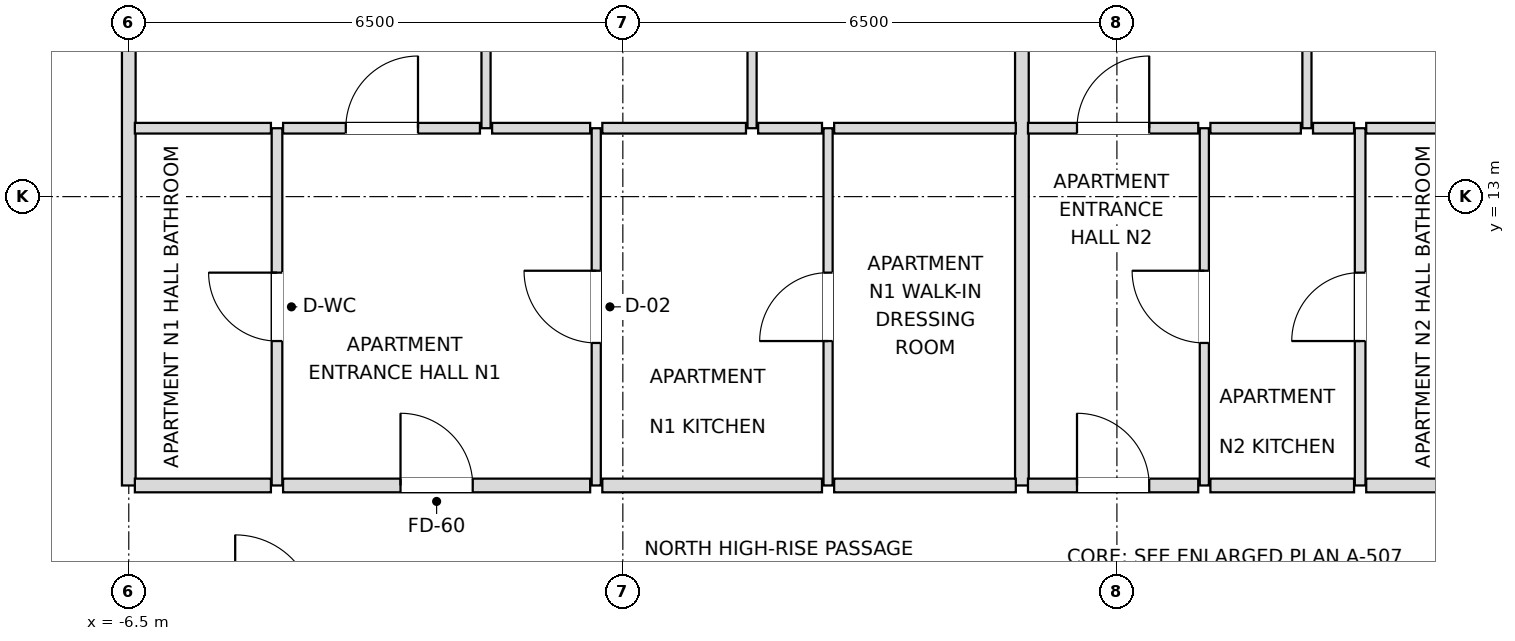
"""IFC4 building model, lengths in metres.
Left out: names, types, materials, properties, quantities, classifications, styles, units other than length and angle.
Written with IfcOpenShell. Run it as: python <this file> out.ifc"""

import sys

from ifc_helpers import new_model, si_unit, direction, frame, frame_2d, origin, place, context, subcontext, project, spatial, rectangle, extrude, element, fill, save


model = new_model("IFC4")
c1 = context("Model", 3, precision=1e-05, world=origin(), true_north=direction((0.0, 1.0)))
c2 = subcontext(c1, "Body", "Model", "MODEL_VIEW")
j1 = project(units=[si_unit("LENGTHUNIT", "METRE"), si_unit("PLANEANGLEUNIT", "RADIAN")], contexts=[c1])
p1 = place(None, origin())
s1 = spatial("IfcSite", under=j1, at=p1, CompositionType="ELEMENT")
p2 = place(p1, origin())
s2 = spatial("IfcBuilding", under=s1, at=p2, CompositionType="ELEMENT")
p3 = place(p2, frame((0.0, 0.0, 243.9)))
s3 = spatial("IfcBuildingStorey", under=s2, at=p3, CompositionType="ELEMENT", Elevation=243.9)
p4 = place(p3, frame((-6.5, 9.2, 0.0), z_axis=(0.0, 0.0, 1.0), x_axis=(0.0, 1.0, 0.0)))
e1 = element("IfcWall", 1, at=p4, inside=s3, PredefinedType="PARTITIONING", context=c2, shape_type="SweptSolid", body=[
    extrude(rectangle(XDim=10.7, YDim=0.18, at=frame_2d((5.35, 0.0))), origin(), (0.0, 0.0, 1.0), 2.826),
])
p5 = place(p3, frame((-4.55, 9.2, 0.0), z_axis=(0.0, 0.0, 1.0), x_axis=(0.0, 1.0, 0.0)))
e2 = element("IfcWall", 2, at=p5, inside=s3, PredefinedType="PARTITIONING", context=c2, shape_type="SweptSolid", body=[
    extrude(rectangle(XDim=4.7, YDim=0.14, at=frame_2d((2.35, 0.0))), origin(), (0.0, 0.0, 1.0), 3.38),
])
p6 = place(p5, frame((1.9, 0.0, 0.0)))
e3 = element("IfcOpeningElement", 3, at=p6, cuts=e2, PredefinedType="OPENING", context=c2, shape_type="SweptSolid", body=[
    extrude(rectangle(XDim=0.9, YDim=2.1, at=frame_2d((0.45, 1.05))), frame((0.0, 0.08, 0.0), z_axis=(0.0, -1.0, 0.0), x_axis=(1.0, 0.0, 0.0)), (0.0, 0.0, 1.0), 0.16),
])
p7 = place(p3, frame((-1.8, 13.9, 0.0), z_axis=(0.0, 0.0, 1.0), x_axis=(0.0, 1.0, 0.0)))
e4 = element("IfcWall", 4, at=p7, inside=s3, PredefinedType="PARTITIONING", context=c2, shape_type="SweptSolid", body=[
    extrude(rectangle(XDim=6.0, YDim=0.12, at=frame_2d((3.0, 0.0))), origin(), (0.0, 0.0, 1.0), 3.018),
])
p8 = place(p7, frame((2.55, 0.0, 0.0)))
e5 = element("IfcOpeningElement", 5, at=p8, cuts=e4, PredefinedType="OPENING", context=c2, shape_type="SweptSolid", body=[
    extrude(rectangle(XDim=0.9, YDim=2.1, at=frame_2d((0.45, 1.05))), frame((0.0, 0.07, 0.0), z_axis=(0.0, -1.0, 0.0), x_axis=(1.0, 0.0, 0.0)), (0.0, 0.0, 1.0), 0.14),
])
p9 = place(p3, frame((-0.35, 9.2, 0.0), z_axis=(0.0, 0.0, 1.0), x_axis=(0.0, 1.0, 0.0)))
e6 = element("IfcWall", 6, at=p9, inside=s3, PredefinedType="PARTITIONING", context=c2, shape_type="SweptSolid", body=[
    extrude(rectangle(XDim=4.7, YDim=0.12, at=frame_2d((2.35, 0.0))), origin(), (0.0, 0.0, 1.0), 3.38),
])
p10 = place(p9, frame((1.875, 0.0, 0.0)))
e7 = element("IfcOpeningElement", 7, at=p10, cuts=e6, PredefinedType="OPENING", context=c2, shape_type="SweptSolid", body=[
    extrude(rectangle(XDim=0.95, YDim=2.1, at=frame_2d((0.475, 1.05))), frame((0.0, 0.07, 0.0), z_axis=(0.0, -1.0, 0.0), x_axis=(1.0, 0.0, 0.0)), (0.0, 0.0, 1.0), 0.14),
])
p11 = place(p3, frame((1.7, 13.9, 0.0), z_axis=(0.0, 0.0, 1.0), x_axis=(0.0, 1.0, 0.0)))
e8 = element("IfcWall", 8, at=p11, inside=s3, PredefinedType="PARTITIONING", context=c2, shape_type="SweptSolid", body=[
    extrude(rectangle(XDim=6.0, YDim=0.12, at=frame_2d((3.0, 0.0))), origin(), (0.0, 0.0, 1.0), 3.018),
])
p12 = place(p11, frame((2.55, 0.0, 0.0)))
e9 = element("IfcOpeningElement", 9, at=p12, cuts=e8, PredefinedType="OPENING", context=c2, shape_type="SweptSolid", body=[
    extrude(rectangle(XDim=0.9, YDim=2.1, at=frame_2d((0.45, 1.05))), frame((0.0, 0.07, 0.0), z_axis=(0.0, -1.0, 0.0), x_axis=(1.0, 0.0, 0.0)), (0.0, 0.0, 1.0), 0.14),
])
p13 = place(p3, frame((2.7, 9.2, 0.0), z_axis=(0.0, 0.0, 1.0), x_axis=(0.0, 1.0, 0.0)))
e10 = element("IfcWall", 10, at=p13, inside=s3, PredefinedType="PARTITIONING", context=c2, shape_type="SweptSolid", body=[
    extrude(rectangle(XDim=4.7, YDim=0.12, at=frame_2d((2.35, 0.0))), origin(), (0.0, 0.0, 1.0), 3.38),
])
p14 = place(p13, frame((1.9, 0.0, 0.0)))
e11 = element("IfcOpeningElement", 11, at=p14, cuts=e10, PredefinedType="OPENING", context=c2, shape_type="SweptSolid", body=[
    extrude(rectangle(XDim=0.9, YDim=2.1, at=frame_2d((0.45, 1.05))), frame((0.0, 0.07, 0.0), z_axis=(0.0, -1.0, 0.0), x_axis=(1.0, 0.0, 0.0)), (0.0, 0.0, 1.0), 0.14),
])
p15 = place(p3, frame((5.25, 9.2, 0.0), z_axis=(0.0, 0.0, 1.0), x_axis=(0.0, 1.0, 0.0)))
e12 = element("IfcWall", 12, at=p15, inside=s3, PredefinedType="PARTITIONING", context=c2, shape_type="SweptSolid", body=[
    extrude(rectangle(XDim=10.7, YDim=0.18, at=frame_2d((5.35, 0.0))), origin(), (0.0, 0.0, 1.0), 3.018),
])
p16 = place(p3, frame((7.65, 9.2, 0.0), z_axis=(0.0, 0.0, 1.0), x_axis=(0.0, 1.0, 0.0)))
e13 = element("IfcWall", 13, at=p16, inside=s3, PredefinedType="PARTITIONING", context=c2, shape_type="SweptSolid", body=[
    extrude(rectangle(XDim=4.7, YDim=0.12, at=frame_2d((2.35, 0.0))), origin(), (0.0, 0.0, 1.0), 2.826),
])
p17 = place(p16, frame((1.875, 0.0, 0.0)))
e14 = element("IfcOpeningElement", 14, at=p17, cuts=e13, PredefinedType="OPENING", context=c2, shape_type="SweptSolid", body=[
    extrude(rectangle(XDim=0.95, YDim=2.1, at=frame_2d((0.475, 1.05))), frame((0.0, 0.07, 0.0), z_axis=(0.0, -1.0, 0.0), x_axis=(1.0, 0.0, 0.0)), (0.0, 0.0, 1.0), 0.14),
])
p18 = place(p3, frame((9.0, 13.9, 0.0), z_axis=(0.0, 0.0, 1.0), x_axis=(0.0, 1.0, 0.0)))
e15 = element("IfcWall", 15, at=p18, inside=s3, PredefinedType="PARTITIONING", context=c2, shape_type="SweptSolid", body=[
    extrude(rectangle(XDim=6.0, YDim=0.12, at=frame_2d((3.0, 0.0))), origin(), (0.0, 0.0, 1.0), 3.38),
])
p19 = place(p18, frame((2.55, 0.0, 0.0)))
e16 = element("IfcOpeningElement", 16, at=p19, cuts=e15, PredefinedType="OPENING", context=c2, shape_type="SweptSolid", body=[
    extrude(rectangle(XDim=0.9, YDim=2.1, at=frame_2d((0.45, 1.05))), frame((0.0, 0.07, 0.0), z_axis=(0.0, -1.0, 0.0), x_axis=(1.0, 0.0, 0.0)), (0.0, 0.0, 1.0), 0.14),
])
p20 = place(p3, frame((9.7, 9.2, 0.0), z_axis=(0.0, 0.0, 1.0), x_axis=(0.0, 1.0, 0.0)))
e17 = element("IfcWall", 17, at=p20, inside=s3, PredefinedType="PARTITIONING", context=c2, shape_type="SweptSolid", body=[
    extrude(rectangle(XDim=4.7, YDim=0.14, at=frame_2d((2.35, 0.0))), origin(), (0.0, 0.0, 1.0), 2.826),
])
p21 = place(p20, frame((1.9, 0.0, 0.0)))
e18 = element("IfcOpeningElement", 18, at=p21, cuts=e17, PredefinedType="OPENING", context=c2, shape_type="SweptSolid", body=[
    extrude(rectangle(XDim=0.9, YDim=2.1, at=frame_2d((0.45, 1.05))), frame((0.0, 0.08, 0.0), z_axis=(0.0, -1.0, 0.0), x_axis=(1.0, 0.0, 0.0)), (0.0, 0.0, 1.0), 0.16),
])
p22 = place(p3, frame((-6.42, 9.2, 0.0), z_axis=(0.0, 0.0, 1.0), x_axis=(1.0, 0.0, 0.0)))
e19 = element("IfcWall", 19, at=p22, inside=s3, PredefinedType="PARTITIONING", context=c2, shape_type="SweptSolid", body=[
    extrude(rectangle(XDim=1.79, YDim=0.18, at=frame_2d((0.895, 0.0))), origin(), (0.0, 0.0, 1.0), 3.38),
])
p23 = place(p3, frame((-4.47, 9.2, 0.0), z_axis=(0.0, 0.0, 1.0), x_axis=(1.0, 0.0, 0.0)))
e20 = element("IfcWall", 20, at=p23, inside=s3, PredefinedType="PARTITIONING", context=c2, shape_type="SweptSolid", body=[
    extrude(rectangle(XDim=4.04, YDim=0.18, at=frame_2d((2.02, 0.0))), origin(), (0.0, 0.0, 1.0), 3.38),
])
p24 = place(p23, frame((1.545, 0.0, 0.0)))
e21 = element("IfcOpeningElement", 21, at=p24, cuts=e20, PredefinedType="OPENING", context=c2, shape_type="SweptSolid", body=[
    extrude(rectangle(XDim=0.95, YDim=2.15, at=frame_2d((0.475, 1.075))), frame((0.0, 0.1, 0.0), z_axis=(0.0, -1.0, 0.0), x_axis=(1.0, 0.0, 0.0)), (0.0, 0.0, 1.0), 0.2),
])
p25 = place(p3, frame((-0.27, 9.2, 0.0), z_axis=(0.0, 0.0, 1.0), x_axis=(1.0, 0.0, 0.0)))
e22 = element("IfcWall", 22, at=p25, inside=s3, PredefinedType="PARTITIONING", context=c2, shape_type="SweptSolid", body=[
    extrude(rectangle(XDim=2.89, YDim=0.18, at=frame_2d((1.445, 0.0))), origin(), (0.0, 0.0, 1.0), 3.38),
])
p26 = place(p3, frame((2.78, 9.2, 0.0), z_axis=(0.0, 0.0, 1.0), x_axis=(1.0, 0.0, 0.0)))
e23 = element("IfcWall", 23, at=p26, inside=s3, PredefinedType="PARTITIONING", context=c2, shape_type="SweptSolid", body=[
    extrude(rectangle(XDim=2.39, YDim=0.18, at=frame_2d((1.195, 0.0))), origin(), (0.0, 0.0, 1.0), 3.38),
])
p27 = place(p3, frame((5.33, 9.2, 0.0), z_axis=(0.0, 0.0, 1.0), x_axis=(1.0, 0.0, 0.0)))
e24 = element("IfcWall", 24, at=p27, inside=s3, PredefinedType="PARTITIONING", context=c2, shape_type="SweptSolid", body=[
    extrude(rectangle(XDim=2.24, YDim=0.18, at=frame_2d((1.12, 0.0))), origin(), (0.0, 0.0, 1.0), 2.826),
])
p28 = place(p27, frame((0.645, 0.0, 0.0)))
e25 = element("IfcOpeningElement", 25, at=p28, cuts=e24, PredefinedType="OPENING", context=c2, shape_type="SweptSolid", body=[
    extrude(rectangle(XDim=0.95, YDim=2.15, at=frame_2d((0.475, 1.075))), frame((0.0, 0.1, 0.0), z_axis=(0.0, -1.0, 0.0), x_axis=(1.0, 0.0, 0.0)), (0.0, 0.0, 1.0), 0.2),
])
p29 = place(p3, frame((7.73, 9.2, 0.0), z_axis=(0.0, 0.0, 1.0), x_axis=(1.0, 0.0, 0.0)))
e26 = element("IfcWall", 26, at=p29, inside=s3, PredefinedType="PARTITIONING", context=c2, shape_type="SweptSolid", body=[
    extrude(rectangle(XDim=1.89, YDim=0.18, at=frame_2d((0.945, 0.0))), origin(), (0.0, 0.0, 1.0), 3.38),
])
p30 = place(p3, frame((9.78, 9.2, 0.0), z_axis=(0.0, 0.0, 1.0), x_axis=(1.0, 0.0, 0.0)))
e27 = element("IfcWall", 27, at=p30, inside=s3, PredefinedType="PARTITIONING", context=c2, shape_type="SweptSolid", body=[
    extrude(rectangle(XDim=1.54, YDim=0.18, at=frame_2d((0.77, 0.0))), origin(), (0.0, 0.0, 1.0), 3.38),
])
p31 = place(p3, frame((-6.42, 13.9, 0.0), z_axis=(0.0, 0.0, 1.0), x_axis=(1.0, 0.0, 0.0)))
e28 = element("IfcWall", 28, at=p31, inside=s3, PredefinedType="PARTITIONING", context=c2, shape_type="SweptSolid", body=[
    extrude(rectangle(XDim=1.79, YDim=0.14, at=frame_2d((0.895, 0.0))), origin(), (0.0, 0.0, 1.0), 3.38),
])
p32 = place(p3, frame((-4.47, 13.9, 0.0), z_axis=(0.0, 0.0, 1.0), x_axis=(1.0, 0.0, 0.0)))
e29 = element("IfcWall", 29, at=p32, inside=s3, PredefinedType="PARTITIONING", context=c2, shape_type="SweptSolid", body=[
    extrude(rectangle(XDim=2.59, YDim=0.14, at=frame_2d((1.295, 0.0))), origin(), (0.0, 0.0, 1.0), 3.38),
])
p33 = place(p32, frame((0.825, 0.0, 0.0)))
e30 = element("IfcOpeningElement", 30, at=p33, cuts=e29, PredefinedType="OPENING", context=c2, shape_type="SweptSolid", body=[
    extrude(rectangle(XDim=0.95, YDim=2.1, at=frame_2d((0.475, 1.05))), frame((0.0, 0.08, 0.0), z_axis=(0.0, -1.0, 0.0), x_axis=(1.0, 0.0, 0.0)), (0.0, 0.0, 1.0), 0.16),
])
p34 = place(p3, frame((-1.72, 13.9, 0.0), z_axis=(0.0, 0.0, 1.0), x_axis=(1.0, 0.0, 0.0)))
e31 = element("IfcWall", 31, at=p34, inside=s3, PredefinedType="PARTITIONING", context=c2, shape_type="SweptSolid", body=[
    extrude(rectangle(XDim=1.29, YDim=0.14, at=frame_2d((0.645, 0.0))), origin(), (0.0, 0.0, 1.0), 3.38),
])
p35 = place(p3, frame((-0.27, 13.9, 0.0), z_axis=(0.0, 0.0, 1.0), x_axis=(1.0, 0.0, 0.0)))
e32 = element("IfcWall", 32, at=p35, inside=s3, PredefinedType="PARTITIONING", context=c2, shape_type="SweptSolid", body=[
    extrude(rectangle(XDim=1.89, YDim=0.14, at=frame_2d((0.945, 0.0))), origin(), (0.0, 0.0, 1.0), 3.38),
])
p36 = place(p3, frame((1.78, 13.9, 0.0), z_axis=(0.0, 0.0, 1.0), x_axis=(1.0, 0.0, 0.0)))
e33 = element("IfcWall", 33, at=p36, inside=s3, PredefinedType="PARTITIONING", context=c2, shape_type="SweptSolid", body=[
    extrude(rectangle(XDim=0.84, YDim=0.14, at=frame_2d((0.42, 0.0))), origin(), (0.0, 0.0, 1.0), 3.38),
])
p37 = place(p3, frame((2.78, 13.9, 0.0), z_axis=(0.0, 0.0, 1.0), x_axis=(1.0, 0.0, 0.0)))
e34 = element("IfcWall", 34, at=p37, inside=s3, PredefinedType="PARTITIONING", context=c2, shape_type="SweptSolid", body=[
    extrude(rectangle(XDim=2.39, YDim=0.14, at=frame_2d((1.195, 0.0))), origin(), (0.0, 0.0, 1.0), 3.38),
])
p38 = place(p3, frame((5.33, 13.9, 0.0), z_axis=(0.0, 0.0, 1.0), x_axis=(1.0, 0.0, 0.0)))
e35 = element("IfcWall", 35, at=p38, inside=s3, PredefinedType="PARTITIONING", context=c2, shape_type="SweptSolid", body=[
    extrude(rectangle(XDim=2.24, YDim=0.14, at=frame_2d((1.12, 0.0))), origin(), (0.0, 0.0, 1.0), 2.826),
])
p39 = place(p38, frame((0.645, 0.0, 0.0)))
e36 = element("IfcOpeningElement", 36, at=p39, cuts=e35, PredefinedType="OPENING", context=c2, shape_type="SweptSolid", body=[
    extrude(rectangle(XDim=0.95, YDim=2.1, at=frame_2d((0.475, 1.05))), frame((0.0, 0.08, 0.0), z_axis=(0.0, -1.0, 0.0), x_axis=(1.0, 0.0, 0.0)), (0.0, 0.0, 1.0), 0.16),
])
p40 = place(p3, frame((7.73, 13.9, 0.0), z_axis=(0.0, 0.0, 1.0), x_axis=(1.0, 0.0, 0.0)))
e37 = element("IfcWall", 37, at=p40, inside=s3, PredefinedType="PARTITIONING", context=c2, shape_type="SweptSolid", body=[
    extrude(rectangle(XDim=1.19, YDim=0.14, at=frame_2d((0.595, 0.0))), origin(), (0.0, 0.0, 1.0), 3.38),
])
p41 = place(p3, frame((9.08, 13.9, 0.0), z_axis=(0.0, 0.0, 1.0), x_axis=(1.0, 0.0, 0.0)))
e38 = element("IfcWall", 38, at=p41, inside=s3, PredefinedType="PARTITIONING", context=c2, shape_type="SweptSolid", body=[
    extrude(rectangle(XDim=0.54, YDim=0.14, at=frame_2d((0.27, 0.0))), origin(), (0.0, 0.0, 1.0), 3.38),
])
p42 = place(p3, frame((9.78, 13.9, 0.0), z_axis=(0.0, 0.0, 1.0), x_axis=(1.0, 0.0, 0.0)))
e39 = element("IfcWall", 39, at=p42, inside=s3, PredefinedType="PARTITIONING", context=c2, shape_type="SweptSolid", body=[
    extrude(rectangle(XDim=1.54, YDim=0.14, at=frame_2d((0.77, 0.0))), origin(), (0.0, 0.0, 1.0), 3.38),
])
p43 = place(p6, origin())
e40 = element("IfcDoor", 40, at=p43, inside=s3, OperationType="SINGLE_SWING_RIGHT", PredefinedType="DOOR", context=c2, shape_type="SweptSolid", body=[
    extrude(rectangle(XDim=0.9, YDim=2.1, at=frame_2d((0.45, 1.05))), frame((0.0, 0.025, 0.0), z_axis=(0.0, -1.0, 0.0), x_axis=(1.0, 0.0, 0.0)), (0.0, 0.0, 1.0), 0.05),
])
fill(e3, e40)
p44 = place(p24, origin())
e41 = element("IfcDoor", 41, at=p44, inside=s3, OperationType="SINGLE_SWING_LEFT", PredefinedType="DOOR", context=c2, shape_type="SweptSolid", body=[
    extrude(rectangle(XDim=0.95, YDim=2.15, at=frame_2d((0.475, 1.075))), frame((0.0, 0.025, 0.0), z_axis=(0.0, -1.0, 0.0), x_axis=(1.0, 0.0, 0.0)), (0.0, 0.0, 1.0), 0.05),
])
fill(e21, e41)
p45 = place(p10, origin())
e42 = element("IfcDoor", 42, at=p45, inside=s3, OperationType="SINGLE_SWING_RIGHT", PredefinedType="DOOR", context=c2, shape_type="SweptSolid", body=[
    extrude(rectangle(XDim=0.95, YDim=2.1, at=frame_2d((0.475, 1.05))), frame((0.0, 0.025, 0.0), z_axis=(0.0, -1.0, 0.0), x_axis=(1.0, 0.0, 0.0)), (0.0, 0.0, 1.0), 0.05),
])
fill(e7, e42)
p46 = place(p14, origin())
e43 = element("IfcDoor", 43, at=p46, inside=s3, OperationType="SINGLE_SWING_LEFT", PredefinedType="DOOR", context=c2, shape_type="SweptSolid", body=[
    extrude(rectangle(XDim=0.9, YDim=2.1, at=frame_2d((0.45, 1.05))), frame((0.0, 0.025, 0.0), z_axis=(0.0, -1.0, 0.0), x_axis=(1.0, 0.0, 0.0)), (0.0, 0.0, 1.0), 0.05),
])
fill(e11, e43)
p47 = place(p33, origin())
e44 = element("IfcDoor", 44, at=p47, inside=s3, OperationType="SINGLE_SWING_RIGHT", PredefinedType="DOOR", context=c2, shape_type="SweptSolid", body=[
    extrude(rectangle(XDim=0.95, YDim=2.1, at=frame_2d((0.475, 1.05))), frame((0.0, 0.025, 0.0), z_axis=(0.0, -1.0, 0.0), x_axis=(1.0, 0.0, 0.0)), (0.0, 0.0, 1.0), 0.05),
])
fill(e30, e44)
p48 = place(p28, origin())
e45 = element("IfcDoor", 45, at=p48, inside=s3, OperationType="SINGLE_SWING_LEFT", PredefinedType="DOOR", context=c2, shape_type="SweptSolid", body=[
    extrude(rectangle(XDim=0.95, YDim=2.15, at=frame_2d((0.475, 1.075))), frame((0.0, 0.025, 0.0), z_axis=(0.0, -1.0, 0.0), x_axis=(1.0, 0.0, 0.0)), (0.0, 0.0, 1.0), 0.05),
])
fill(e25, e45)
p49 = place(p17, origin())
e46 = element("IfcDoor", 46, at=p49, inside=s3, OperationType="SINGLE_SWING_RIGHT", PredefinedType="DOOR", context=c2, shape_type="SweptSolid", body=[
    extrude(rectangle(XDim=0.95, YDim=2.1, at=frame_2d((0.475, 1.05))), frame((0.0, 0.025, 0.0), z_axis=(0.0, -1.0, 0.0), x_axis=(1.0, 0.0, 0.0)), (0.0, 0.0, 1.0), 0.05),
])
fill(e14, e46)
p50 = place(p21, origin())
e47 = element("IfcDoor", 47, at=p50, inside=s3, OperationType="SINGLE_SWING_LEFT", PredefinedType="DOOR", context=c2, shape_type="SweptSolid", body=[
    extrude(rectangle(XDim=0.9, YDim=2.1, at=frame_2d((0.45, 1.05))), frame((0.0, 0.025, 0.0), z_axis=(0.0, -1.0, 0.0), x_axis=(1.0, 0.0, 0.0)), (0.0, 0.0, 1.0), 0.05),
])
fill(e18, e47)
p51 = place(p39, origin())
e48 = element("IfcDoor", 48, at=p51, inside=s3, OperationType="SINGLE_SWING_RIGHT", PredefinedType="DOOR", context=c2, shape_type="SweptSolid", body=[
    extrude(rectangle(XDim=0.95, YDim=2.1, at=frame_2d((0.475, 1.05))), frame((0.0, 0.025, 0.0), z_axis=(0.0, -1.0, 0.0), x_axis=(1.0, 0.0, 0.0)), (0.0, 0.0, 1.0), 0.05),
])
fill(e36, e48)
save(model, sys.argv[1])
